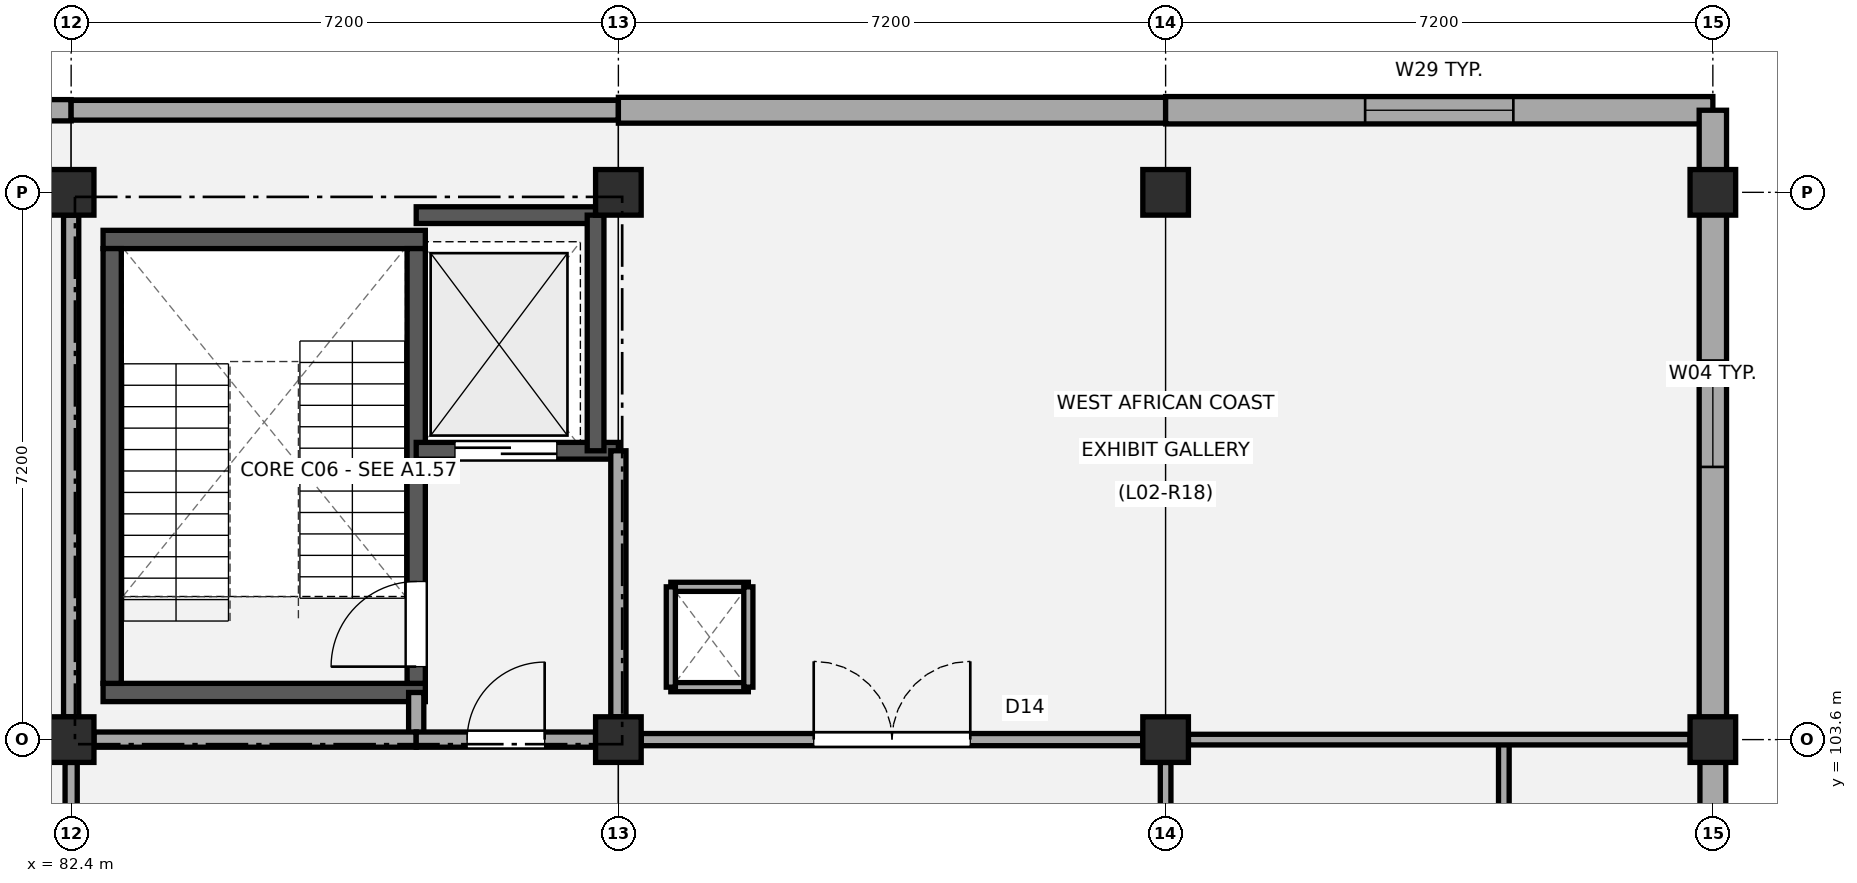
"""IFC4 building model, lengths in metres.
Left out: names, types, materials, properties, quantities, classifications, styles, units other than length and angle.
Written with IfcOpenShell. Run it as: python <this file> out.ifc"""

import sys

from ifc_helpers import new_model, si_unit, direction, frame, frame_2d, origin, origin_2d, place, context, subcontext, project, spatial, rectangle, extrude, element, fill, save


model = new_model("IFC4")
c1 = context("Model", 3, precision=1e-05, world=origin(), true_north=direction((0.0, 1.0)))
c2 = subcontext(c1, "Body", "Model", "MODEL_VIEW")
j1 = project(units=[si_unit("LENGTHUNIT", "METRE"), si_unit("PLANEANGLEUNIT", "RADIAN")], contexts=[c1])
p1 = place(None, origin())
s1 = spatial("IfcSite", under=j1, at=p1, CompositionType="ELEMENT")
p2 = place(p1, origin())
s2 = spatial("IfcBuilding", under=s1, at=p2, CompositionType="ELEMENT")
p3 = place(p2, frame((0.0, 0.0, 9.18)))
s3 = spatial("IfcBuildingStorey", under=s2, at=p3, CompositionType="ELEMENT", Elevation=9.18)
for number, where, z_axis, x_axis in (
    (1, (82.4, 103.6, 0.0), (0.0, 0.0, 1.0), (1.0, 0.0, 0.0)),
    (2, (82.4, 110.8, 0.0), (0.0, 0.0, 1.0), (1.0, 0.0, 0.0)),
    (3, (89.6, 103.6, 0.0), (0.0, 0.0, 1.0), (1.0, 0.0, 0.0)),
    (4, (89.6, 110.8, 0.0), (0.0, 0.0, 1.0), (1.0, 0.0, 0.0)),
    (5, (96.8, 103.6, 0.0), (0.0, 0.0, 1.0), (1.0, 0.0, 0.0)),
    (6, (96.8, 110.8, 0.0), (0.0, 0.0, 1.0), (1.0, 0.0, 0.0)),
    (7, (104.0, 103.6, 0.0), (0.0, 0.0, 1.0), (1.0, 0.0, 0.0)),
    (8, (104.0, 110.8, 0.0), (0.0, 0.0, 1.0), (1.0, 0.0, 0.0)),
):
    element("IfcColumn", number, at=place(p3, frame(where, z_axis=z_axis, x_axis=x_axis)), inside=s3, PredefinedType="COLUMN", context=c2, shape_type="SweptSolid", body=[
        extrude(rectangle(XDim=0.6, YDim=0.6, at=origin_2d()), origin(), (0.0, 0.0, 1.0), 4.32),
    ])
p4 = place(p3, frame((75.2, 111.88, 0.0), z_axis=(0.0, 0.0, 1.0), x_axis=(1.0, 0.0, 0.0)))
e9 = element("IfcWall", 9, at=p4, inside=s3, PredefinedType="STANDARD", context=c2, shape_type="SweptSolid", body=[
    extrude(rectangle(XDim=7.2, YDim=0.28, at=frame_2d((3.6, 0.0))), origin(), (0.0, 0.0, 1.0), 4.01),
])
p5 = place(p3, frame((82.4, 111.88, 0.0), z_axis=(0.0, 0.0, 1.0), x_axis=(1.0, 0.0, 0.0)))
e10 = element("IfcWall", 10, at=p5, inside=s3, PredefinedType="STANDARD", context=c2, shape_type="SweptSolid", body=[
    extrude(rectangle(XDim=7.2, YDim=0.26, at=frame_2d((3.6, 0.0))), origin(), (0.0, 0.0, 1.0), 4.03),
])
p6 = place(p3, frame((89.6, 111.88, 0.0), z_axis=(0.0, 0.0, 1.0), x_axis=(1.0, 0.0, 0.0)))
e11 = element("IfcWall", 11, at=p6, inside=s3, PredefinedType="STANDARD", context=c2, shape_type="SweptSolid", body=[
    extrude(rectangle(XDim=7.2, YDim=0.34, at=frame_2d((3.6, 0.0))), origin(), (0.0, 0.0, 1.0), 4.01),
])
p7 = place(p3, frame((96.8, 111.88, 0.0), z_axis=(0.0, 0.0, 1.0), x_axis=(1.0, 0.0, 0.0)))
e12 = element("IfcWall", 12, at=p7, inside=s3, PredefinedType="STANDARD", context=c2, shape_type="SweptSolid", body=[
    extrude(rectangle(XDim=7.2, YDim=0.36, at=frame_2d((3.6, 0.0))), origin(), (0.0, 0.0, 1.0), 4.03),
])
p8 = place(p7, frame((2.625, 0.0, 0.95)))
e13 = element("IfcOpeningElement", 13, at=p8, cuts=e12, PredefinedType="OPENING", context=c2, shape_type="SweptSolid", body=[
    extrude(rectangle(XDim=1.95, YDim=1.35, at=frame_2d((0.975, 0.675))), frame((0.0, 0.19, 0.0), z_axis=(0.0, -1.0, 0.0), x_axis=(1.0, 0.0, 0.0)), (0.0, 0.0, 1.0), 0.38),
])
p9 = place(p3, frame((104.0, 103.305, 0.0), z_axis=(0.0, 0.0, 1.0), x_axis=(0.0, -1.0, 0.0)))
e14 = element("IfcWall", 14, at=p9, inside=s3, PredefinedType="STANDARD", context=c2, shape_type="SweptSolid", body=[
    extrude(rectangle(XDim=6.61, YDim=0.34, at=frame_2d((3.305, 0.0))), origin(), (0.0, 0.0, 1.0), 3.46),
])
p10 = place(p3, frame((104.0, 111.88, 0.0), z_axis=(0.0, 0.0, 1.0), x_axis=(0.0, -1.0, 0.0)))
e15 = element("IfcWall", 15, at=p10, inside=s3, PredefinedType="STANDARD", context=c2, shape_type="SweptSolid", body=[
    extrude(rectangle(XDim=7.985, YDim=0.36, at=frame_2d((3.992, 0.0))), origin(), (0.0, 0.0, 1.0), 3.48),
])
p11 = place(p10, frame((3.292, 0.0, 0.95)))
e16 = element("IfcOpeningElement", 16, at=p11, cuts=e15, PredefinedType="OPENING", context=c2, shape_type="SweptSolid", body=[
    extrude(rectangle(XDim=1.4, YDim=1.6, at=frame_2d((0.7, 0.8))), frame((0.0, 0.19, 0.0), z_axis=(0.0, -1.0, 0.0), x_axis=(1.0, 0.0, 0.0)), (0.0, 0.0, 1.0), 0.38),
])
for number, where, z_axis, x_axis in (
    (17, (82.82, 104.22, 0.0), (0.0, 0.0, 1.0), (1.0, 0.0, 0.0)),
    (18, (82.82, 110.18, 0.0), (0.0, 0.0, 1.0), (1.0, 0.0, 0.0)),
):
    element("IfcWall", number, at=place(p3, frame(where, z_axis=z_axis, x_axis=x_axis)), inside=s3, PredefinedType="SHEAR", context=c2, shape_type="SweptSolid", body=[
        extrude(rectangle(XDim=4.24, YDim=0.24, at=frame_2d((2.12, 0.0))), origin(), (0.0, 0.0, 1.0), 4.04),
    ])
p12 = place(p3, frame((82.94, 104.34, 0.0), z_axis=(0.0, 0.0, 1.0), x_axis=(0.0, 1.0, 0.0)))
e19 = element("IfcWall", 19, at=p12, inside=s3, PredefinedType="SHEAR", context=c2, shape_type="SweptSolid", body=[
    extrude(rectangle(XDim=5.72, YDim=0.24, at=frame_2d((2.86, 0.0))), origin(), (0.0, 0.0, 1.0), 4.04),
])
p13 = place(p3, frame((86.94, 104.34, 0.0), z_axis=(0.0, 0.0, 1.0), x_axis=(0.0, 1.0, 0.0)))
e20 = element("IfcWall", 20, at=p13, inside=s3, PredefinedType="SHEAR", context=c2, shape_type="SweptSolid", body=[
    extrude(rectangle(XDim=5.72, YDim=0.24, at=frame_2d((2.86, 0.0))), origin(), (0.0, 0.0, 1.0), 4.04),
])
p14 = place(p13, frame((0.22, 0.0, 0.0)))
e21 = element("IfcOpeningElement", 21, at=p14, cuts=e20, PredefinedType="OPENING", context=c2, shape_type="SweptSolid", body=[
    extrude(rectangle(XDim=1.12, YDim=2.15, at=frame_2d((0.56, 1.075))), frame((0.0, 0.13, 0.0), z_axis=(0.0, -1.0, 0.0), x_axis=(1.0, 0.0, 0.0)), (0.0, 0.0, 1.0), 0.26),
])
p15 = place(p3, frame((86.94, 107.4, 0.0), z_axis=(0.0, 0.0, 1.0), x_axis=(1.0, 0.0, 0.0)))
e22 = element("IfcWall", 22, at=p15, inside=s3, PredefinedType="SHEAR", context=c2, shape_type="SweptSolid", body=[
    extrude(rectangle(XDim=2.66, YDim=0.22, at=frame_2d((1.33, 0.0))), origin(), (0.0, 0.0, 1.0), 4.04),
])
p16 = place(p15, frame((0.51, 0.0, 0.0)))
e23 = element("IfcOpeningElement", 23, at=p16, cuts=e22, PredefinedType="OPENING", context=c2, shape_type="SweptSolid", body=[
    extrude(rectangle(XDim=1.34, YDim=2.15, at=frame_2d((0.67, 1.075))), frame((0.0, 0.12, 0.0), z_axis=(0.0, -1.0, 0.0), x_axis=(1.0, 0.0, 0.0)), (0.0, 0.0, 1.0), 0.24),
])
p17 = place(p3, frame((86.94, 110.5, 0.0), z_axis=(0.0, 0.0, 1.0), x_axis=(1.0, 0.0, 0.0)))
e24 = element("IfcWall", 24, at=p17, inside=s3, PredefinedType="SHEAR", context=c2, shape_type="SweptSolid", body=[
    extrude(rectangle(XDim=2.36, YDim=0.22, at=frame_2d((1.18, 0.0))), origin(), (0.0, 0.0, 1.0), 4.04),
])
p18 = place(p3, frame((89.3, 107.4, 0.0), z_axis=(0.0, 0.0, 1.0), x_axis=(0.0, 1.0, 0.0)))
e25 = element("IfcWall", 25, at=p18, inside=s3, PredefinedType="SHEAR", context=c2, shape_type="SweptSolid", body=[
    extrude(rectangle(XDim=3.1, YDim=0.22, at=frame_2d((1.55, 0.0))), origin(), (0.0, 0.0, 1.0), 4.04),
])
p19 = place(p3, frame((86.94, 103.6, 0.0), z_axis=(0.0, 0.0, 1.0), x_axis=(0.0, 1.0, 0.0)))
e26 = element("IfcWall", 26, at=p19, inside=s3, PredefinedType="PARTITIONING", context=c2, shape_type="SweptSolid", body=[
    extrude(rectangle(XDim=0.62, YDim=0.2, at=frame_2d((0.31, 0.0))), origin(), (0.0, 0.0, 1.0), 3.41),
])
p20 = place(p3, frame((82.4, 103.9, 0.0), z_axis=(0.0, 0.0, 1.0), x_axis=(0.0, 1.0, 0.0)))
e27 = element("IfcWall", 27, at=p20, inside=s3, PredefinedType="PARTITIONING", context=c2, shape_type="SweptSolid", body=[
    extrude(rectangle(XDim=6.6, YDim=0.2, at=frame_2d((3.3, 0.0))), origin(), (0.0, 0.0, 1.0), 3.36),
])
p21 = place(p3, frame((89.6, 103.9, 0.0), z_axis=(0.0, 0.0, 1.0), x_axis=(0.0, 1.0, 0.0)))
e28 = element("IfcWall", 28, at=p21, inside=s3, PredefinedType="PARTITIONING", context=c2, shape_type="SweptSolid", body=[
    extrude(rectangle(XDim=3.5, YDim=0.2, at=frame_2d((1.75, 0.0))), origin(), (0.0, 0.0, 1.0), 3.36),
])
p22 = place(p3, frame((82.7, 103.6, 0.0), z_axis=(0.0, 0.0, 1.0), x_axis=(1.0, 0.0, 0.0)))
e29 = element("IfcWall", 29, at=p22, inside=s3, PredefinedType="PARTITIONING", context=c2, shape_type="SweptSolid", body=[
    extrude(rectangle(XDim=4.24, YDim=0.2, at=frame_2d((2.12, 0.0))), origin(), (0.0, 0.0, 1.0), 3.41),
])
p23 = place(p3, frame((86.94, 103.6, 0.0), z_axis=(0.0, 0.0, 1.0), x_axis=(1.0, 0.0, 0.0)))
e30 = element("IfcWall", 30, at=p23, inside=s3, PredefinedType="PARTITIONING", context=c2, shape_type="SweptSolid", body=[
    extrude(rectangle(XDim=2.36, YDim=0.2, at=frame_2d((1.18, 0.0))), origin(), (0.0, 0.0, 1.0), 3.41),
])
p24 = place(p23, frame((0.67, 0.0, 0.0)))
e31 = element("IfcOpeningElement", 31, at=p24, cuts=e30, PredefinedType="OPENING", context=c2, shape_type="SweptSolid", body=[
    extrude(rectangle(XDim=1.02, YDim=2.15, at=frame_2d((0.51, 1.075))), frame((0.0, 0.11, 0.0), z_axis=(0.0, -1.0, 0.0), x_axis=(1.0, 0.0, 0.0)), (0.0, 0.0, 1.0), 0.22),
])
for number, where, z_axis, x_axis in (
    (32, (90.29, 104.29, 0.0), (0.0, 0.0, 1.0), (1.0, 0.0, 0.0)),
    (33, (90.29, 105.61, 0.0), (0.0, 0.0, 1.0), (1.0, 0.0, 0.0)),
):
    element("IfcWall", number, at=place(p3, frame(where, z_axis=z_axis, x_axis=x_axis)), inside=s3, PredefinedType="PARTITIONING", context=c2, shape_type="SweptSolid", body=[
        extrude(rectangle(XDim=1.02, YDim=0.12, at=frame_2d((0.51, 0.0))), origin(), (0.0, 0.0, 1.0), 4.0),
    ])
for number, where, z_axis, x_axis in (
    (34, (90.29, 104.29, 0.0), (0.0, 0.0, 1.0), (0.0, 1.0, 0.0)),
    (35, (91.31, 104.29, 0.0), (0.0, 0.0, 1.0), (0.0, 1.0, 0.0)),
):
    element("IfcWall", number, at=place(p3, frame(where, z_axis=z_axis, x_axis=x_axis)), inside=s3, PredefinedType="PARTITIONING", context=c2, shape_type="SweptSolid", body=[
        extrude(rectangle(XDim=1.32, YDim=0.12, at=frame_2d((0.66, 0.0))), origin(), (0.0, 0.0, 1.0), 4.0),
    ])
p25 = place(p3, frame((101.25, 96.4, 0.0), z_axis=(0.0, 0.0, 1.0), x_axis=(0.0, 1.0, 0.0)))
e36 = element("IfcWall", 36, at=p25, inside=s3, PredefinedType="PARTITIONING", context=c2, shape_type="SweptSolid", body=[
    extrude(rectangle(XDim=7.2, YDim=0.14, at=frame_2d((3.6, 0.0))), origin(), (0.0, 0.0, 1.0), 3.44),
])
p26 = place(p3, frame((97.1, 103.6, 0.0), z_axis=(0.0, 0.0, 1.0), x_axis=(1.0, 0.0, 0.0)))
e37 = element("IfcWall", 37, at=p26, inside=s3, PredefinedType="PARTITIONING", context=c2, shape_type="SweptSolid", body=[
    extrude(rectangle(XDim=6.6, YDim=0.14, at=frame_2d((3.3, 0.0))), origin(), (0.0, 0.0, 1.0), 3.41),
])
p27 = place(p3, frame((96.8, 96.7, 0.0), z_axis=(0.0, 0.0, 1.0), x_axis=(0.0, 1.0, 0.0)))
e38 = element("IfcWall", 38, at=p27, inside=s3, PredefinedType="PARTITIONING", context=c2, shape_type="SweptSolid", body=[
    extrude(rectangle(XDim=6.6, YDim=0.14, at=frame_2d((3.3, 0.0))), origin(), (0.0, 0.0, 1.0), 3.41),
])
p28 = place(p3, frame((82.4, 96.7, 0.0), z_axis=(0.0, 0.0, 1.0), x_axis=(0.0, 1.0, 0.0)))
e39 = element("IfcWall", 39, at=p28, inside=s3, PredefinedType="PARTITIONING", context=c2, shape_type="SweptSolid", body=[
    extrude(rectangle(XDim=6.6, YDim=0.16, at=frame_2d((3.3, 0.0))), origin(), (0.0, 0.0, 1.0), 3.41),
])
p29 = place(p28, frame((2.37, 0.0, 0.0)))
e40 = element("IfcOpeningElement", 40, at=p29, cuts=e39, PredefinedType="OPENING", context=c2, shape_type="SweptSolid", body=[
    extrude(rectangle(XDim=1.86, YDim=2.26, at=frame_2d((0.93, 1.13))), frame((0.0, 0.09, 0.0), z_axis=(0.0, -1.0, 0.0), x_axis=(1.0, 0.0, 0.0)), (0.0, 0.0, 1.0), 0.18),
])
p30 = place(p3, frame((89.9, 103.6, 0.0), z_axis=(0.0, 0.0, 1.0), x_axis=(1.0, 0.0, 0.0)))
e41 = element("IfcWall", 41, at=p30, inside=s3, PredefinedType="PARTITIONING", context=c2, shape_type="SweptSolid", body=[
    extrude(rectangle(XDim=6.6, YDim=0.16, at=frame_2d((3.3, 0.0))), origin(), (0.0, 0.0, 1.0), 3.36),
])
p31 = place(p30, frame((2.27, 0.0, 0.0)))
e42 = element("IfcOpeningElement", 42, at=p31, cuts=e41, PredefinedType="OPENING", context=c2, shape_type="SweptSolid", body=[
    extrude(rectangle(XDim=2.06, YDim=2.28, at=frame_2d((1.03, 1.14))), frame((0.0, 0.09, 0.0), z_axis=(0.0, -1.0, 0.0), x_axis=(1.0, 0.0, 0.0)), (0.0, 0.0, 1.0), 0.18),
])
p32 = place(p8, origin())
e43 = element("IfcWindow", 43, at=p32, inside=s3, PartitioningType="SINGLE_PANEL", PredefinedType="WINDOW", context=c2, shape_type="SweptSolid", body=[
    extrude(rectangle(XDim=1.95, YDim=1.35, at=frame_2d((0.975, 0.675))), frame((0.0, 0.03, 0.0), z_axis=(0.0, -1.0, 0.0), x_axis=(1.0, 0.0, 0.0)), (0.0, 0.0, 1.0), 0.06),
])
fill(e13, e43)
p33 = place(p11, origin())
e44 = element("IfcWindow", 44, at=p33, inside=s3, PartitioningType="SINGLE_PANEL", PredefinedType="WINDOW", context=c2, shape_type="SweptSolid", body=[
    extrude(rectangle(XDim=1.4, YDim=1.6, at=frame_2d((0.7, 0.8))), frame((0.0, 0.03, 0.0), z_axis=(0.0, -1.0, 0.0), x_axis=(1.0, 0.0, 0.0)), (0.0, 0.0, 1.0), 0.06),
])
fill(e16, e44)
p34 = place(p14, origin())
e45 = element("IfcDoor", 45, at=p34, inside=s3, OperationType="SINGLE_SWING_LEFT", PredefinedType="DOOR", context=c2, shape_type="SweptSolid", body=[
    extrude(rectangle(XDim=1.12, YDim=2.15, at=frame_2d((0.56, 1.075))), frame((0.0, 0.025, 0.0), z_axis=(0.0, -1.0, 0.0), x_axis=(1.0, 0.0, 0.0)), (0.0, 0.0, 1.0), 0.05),
])
fill(e21, e45)
p35 = place(p16, origin())
e46 = element("IfcDoor", 46, at=p35, inside=s3, OperationType="DOUBLE_DOOR_SLIDING", PredefinedType="DOOR", context=c2, shape_type="SweptSolid", body=[
    extrude(rectangle(XDim=1.34, YDim=2.15, at=frame_2d((0.67, 1.075))), frame((0.0, 0.025, 0.0), z_axis=(0.0, -1.0, 0.0), x_axis=(1.0, 0.0, 0.0)), (0.0, 0.0, 1.0), 0.05),
])
fill(e23, e46)
p36 = place(p24, origin())
e47 = element("IfcDoor", 47, at=p36, inside=s3, OperationType="SINGLE_SWING_RIGHT", PredefinedType="DOOR", context=c2, shape_type="SweptSolid", body=[
    extrude(rectangle(XDim=1.02, YDim=2.15, at=frame_2d((0.51, 1.075))), frame((0.0, 0.025, 0.0), z_axis=(0.0, -1.0, 0.0), x_axis=(1.0, 0.0, 0.0)), (0.0, 0.0, 1.0), 0.05),
])
fill(e31, e47)
p37 = place(p31, origin())
e48 = element("IfcDoor", 48, at=p37, inside=s3, OperationType="DOUBLE_DOOR_SINGLE_SWING", PredefinedType="DOOR", context=c2, shape_type="SweptSolid", body=[
    extrude(rectangle(XDim=2.06, YDim=2.28, at=frame_2d((1.03, 1.14))), frame((0.0, 0.025, 0.0), z_axis=(0.0, -1.0, 0.0), x_axis=(1.0, 0.0, 0.0)), (0.0, 0.0, 1.0), 0.05),
])
fill(e42, e48)
save(model, sys.argv[1])
